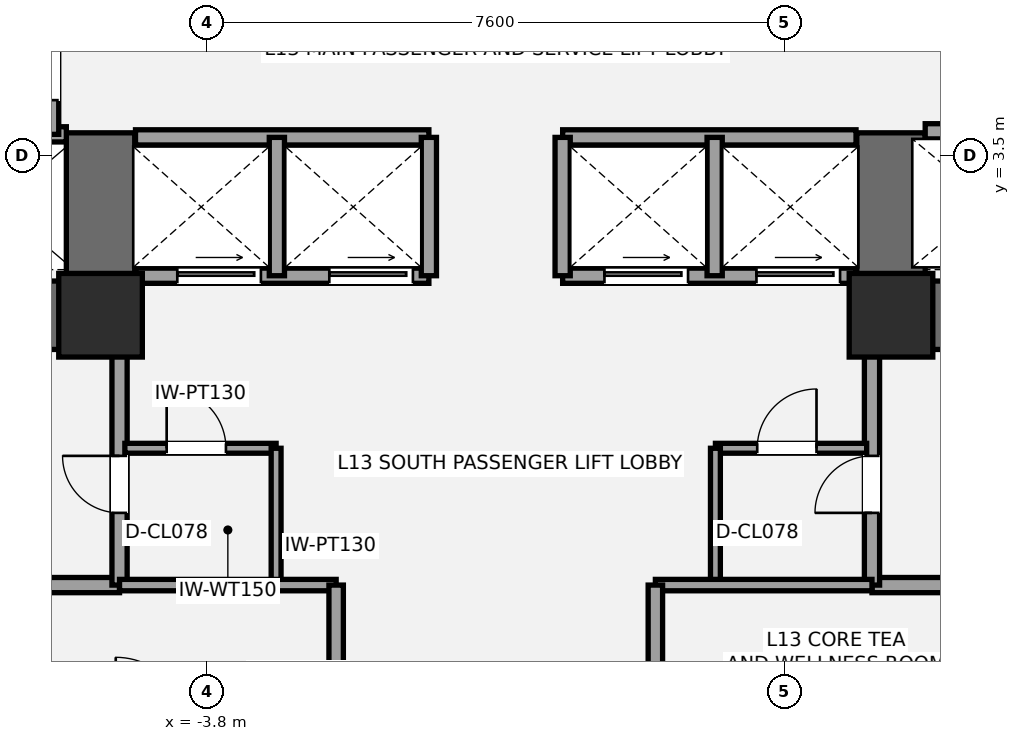
"""IFC4 building model, lengths in metres.
Left out: names, types, materials, properties, quantities, classifications, styles, units other than length and angle.
Written with IfcOpenShell. Run it as: python <this file> out.ifc"""

import sys

from ifc_helpers import new_model, si_unit, direction, frame, frame_2d, origin, origin_2d, place, context, subcontext, project, spatial, rectangle, extrude, element, fill, save


model = new_model("IFC4")
c1 = context("Model", 3, precision=1e-05, world=origin(), true_north=direction((0.0, 1.0)))
c2 = subcontext(c1, "Body", "Model", "MODEL_VIEW")
j1 = project(units=[si_unit("LENGTHUNIT", "METRE"), si_unit("PLANEANGLEUNIT", "RADIAN")], contexts=[c1])
p1 = place(None, origin())
s1 = spatial("IfcSite", under=j1, at=p1, CompositionType="ELEMENT")
p2 = place(p1, origin())
s2 = spatial("IfcBuilding", under=s1, at=p2, CompositionType="ELEMENT")
p3 = place(p2, frame((0.0, 0.0, 52.2)))
s3 = spatial("IfcBuildingStorey", under=s2, at=p3, CompositionType="ELEMENT", Elevation=52.2)
p4 = place(p3, frame((-4.75, 1.4, 0.0), z_axis=(0.0, 0.0, 1.0), x_axis=(-1.0, 0.0, 0.0)))
e1 = element("IfcWall", 1, at=p4, inside=s3, PredefinedType="SHEAR", context=c2, shape_type="SweptSolid", body=[
    extrude(rectangle(XDim=9.3, YDim=0.9, at=frame_2d((4.65, 0.0))), origin(), (0.0, 0.0, 1.0), 3.6),
])
p5 = place(p4, frame((5.55, 0.0, 0.0)))
e2 = element("IfcOpeningElement", 2, at=p5, cuts=e1, PredefinedType="OPENING", context=c2, shape_type="SweptSolid", body=[
    extrude(rectangle(XDim=1.05, YDim=2.15, at=frame_2d((0.525, 1.075))), frame((0.0, 0.46, 0.0), z_axis=(0.0, -1.0, 0.0), x_axis=(1.0, 0.0, 0.0)), (0.0, 0.0, 1.0), 0.92),
])
p6 = place(p4, frame((3.88, 0.0, 0.0)))
e3 = element("IfcOpeningElement", 3, at=p6, cuts=e1, PredefinedType="OPENING", context=c2, shape_type="SweptSolid", body=[
    extrude(rectangle(XDim=1.1, YDim=2.2, at=frame_2d((0.55, 1.1))), frame((0.0, 0.46, 0.0), z_axis=(0.0, -1.0, 0.0), x_axis=(1.0, 0.0, 0.0)), (0.0, 0.0, 1.0), 0.92),
])
p7 = place(p3, frame((-5.2, 0.95, 0.0), z_axis=(0.0, 0.0, 1.0), x_axis=(0.0, 1.0, 0.0)))
e4 = element("IfcWall", 4, at=p7, inside=s3, PredefinedType="SHEAR", context=c2, shape_type="SweptSolid", body=[
    extrude(rectangle(XDim=2.85, YDim=0.9, at=frame_2d((1.425, 0.0))), origin(), (0.0, 0.0, 1.0), 3.6),
])
p8 = place(p3, frame((14.05, 1.4, 0.0), z_axis=(0.0, 0.0, 1.0), x_axis=(-1.0, 0.0, 0.0)))
e5 = element("IfcWall", 5, at=p8, inside=s3, PredefinedType="SHEAR", context=c2, shape_type="SweptSolid", body=[
    extrude(rectangle(XDim=9.3, YDim=0.9, at=frame_2d((4.65, 0.0))), origin(), (0.0, 0.0, 1.0), 3.6),
])
p9 = place(p8, frame((2.7, 0.0, 0.0)))
e6 = element("IfcOpeningElement", 6, at=p9, cuts=e5, PredefinedType="OPENING", context=c2, shape_type="SweptSolid", body=[
    extrude(rectangle(XDim=1.05, YDim=2.15, at=frame_2d((0.525, 1.075))), frame((0.0, 0.46, 0.0), z_axis=(0.0, -1.0, 0.0), x_axis=(1.0, 0.0, 0.0)), (0.0, 0.0, 1.0), 0.92),
])
p10 = place(p8, frame((4.7, 0.0, 0.0)))
e7 = element("IfcOpeningElement", 7, at=p10, cuts=e5, PredefinedType="OPENING", context=c2, shape_type="SweptSolid", body=[
    extrude(rectangle(XDim=1.1, YDim=2.2, at=frame_2d((0.55, 1.1))), frame((0.0, 0.46, 0.0), z_axis=(0.0, -1.0, 0.0), x_axis=(1.0, 0.0, 0.0)), (0.0, 0.0, 1.0), 0.92),
])
p11 = place(p3, frame((5.2, 0.95, 0.0), z_axis=(0.0, 0.0, 1.0), x_axis=(0.0, 1.0, 0.0)))
e8 = element("IfcWall", 8, at=p11, inside=s3, PredefinedType="SHEAR", context=c2, shape_type="SweptSolid", body=[
    extrude(rectangle(XDim=2.85, YDim=0.9, at=frame_2d((1.425, 0.0))), origin(), (0.0, 0.0, 1.0), 3.6),
])
for number, where, z_axis, x_axis in (
    (9, (-5.2, 1.4, 0.0), (0.0, 0.0, 1.0), (1.0, 0.0, 0.0)),
    (10, (5.2, 1.4, 0.0), (0.0, 0.0, 1.0), (1.0, 0.0, 0.0)),
):
    element("IfcColumn", number, at=place(p3, frame(where, z_axis=z_axis, x_axis=x_axis)), inside=s3, PredefinedType="COLUMN", context=c2, shape_type="SweptSolid", body=[
        extrude(rectangle(XDim=1.1, YDim=1.1, at=origin_2d()), origin(), (0.0, 0.0, 1.0), 3.6),
    ])
p12 = place(p3, frame((-7.2, -2.15, 0.0), z_axis=(0.0, 0.0, 1.0), x_axis=(1.0, 0.0, 0.0)))
e11 = element("IfcWall", 11, at=p12, inside=s3, PredefinedType="SOLIDWALL", context=c2, shape_type="SweptSolid", body=[
    extrude(rectangle(XDim=2.25, YDim=0.2, at=frame_2d((1.125, 0.0))), origin(), (0.0, 0.0, 1.0), 3.4),
])
p13 = place(p3, frame((-4.95, -2.15, 0.0), z_axis=(0.0, 0.0, 1.0), x_axis=(0.0, 1.0, 0.0)))
e12 = element("IfcWall", 12, at=p13, inside=s3, PredefinedType="SOLIDWALL", context=c2, shape_type="SweptSolid", body=[
    extrude(rectangle(XDim=3.15, YDim=0.2, at=frame_2d((1.575, 0.0))), origin(), (0.0, 0.0, 1.0), 2.853),
])
p14 = place(p13, frame((0.95, 0.0, 0.0)))
e13 = element("IfcOpeningElement", 13, at=p14, cuts=e12, PredefinedType="OPENING", context=c2, shape_type="SweptSolid", body=[
    extrude(rectangle(XDim=0.75, YDim=2.1, at=frame_2d((0.375, 1.05))), frame((0.0, 0.11, 0.0), z_axis=(0.0, -1.0, 0.0), x_axis=(1.0, 0.0, 0.0)), (0.0, 0.0, 1.0), 0.22),
])
p15 = place(p3, frame((4.95, -2.15, 0.0), z_axis=(0.0, 0.0, 1.0), x_axis=(1.0, 0.0, 0.0)))
e14 = element("IfcWall", 14, at=p15, inside=s3, PredefinedType="SOLIDWALL", context=c2, shape_type="SweptSolid", body=[
    extrude(rectangle(XDim=2.25, YDim=0.2, at=frame_2d((1.125, 0.0))), origin(), (0.0, 0.0, 1.0), 3.4),
])
p16 = place(p3, frame((4.95, -2.15, 0.0), z_axis=(0.0, 0.0, 1.0), x_axis=(0.0, 1.0, 0.0)))
e15 = element("IfcWall", 15, at=p16, inside=s3, PredefinedType="SOLIDWALL", context=c2, shape_type="SweptSolid", body=[
    extrude(rectangle(XDim=3.15, YDim=0.2, at=frame_2d((1.575, 0.0))), origin(), (0.0, 0.0, 1.0), 2.853),
])
p17 = place(p16, frame((0.95, 0.0, 0.0)))
e16 = element("IfcOpeningElement", 16, at=p17, cuts=e15, PredefinedType="OPENING", context=c2, shape_type="SweptSolid", body=[
    extrude(rectangle(XDim=0.75, YDim=2.1, at=frame_2d((0.375, 1.05))), frame((0.0, 0.11, 0.0), z_axis=(0.0, -1.0, 0.0), x_axis=(1.0, 0.0, 0.0)), (0.0, 0.0, 1.0), 0.22),
])
p18 = place(p3, frame((-4.88, -0.35, 0.0), z_axis=(0.0, 0.0, 1.0), x_axis=(1.0, 0.0, 0.0)))
e17 = element("IfcWall", 17, at=p18, inside=s3, PredefinedType="PARTITIONING", context=c2, shape_type="SweptSolid", body=[
    extrude(rectangle(XDim=1.99, YDim=0.13, at=frame_2d((0.995, 0.0))), origin(), (0.0, 0.0, 1.0), 3.4),
])
p19 = place(p18, frame((0.55, 0.0, 0.0)))
e18 = element("IfcOpeningElement", 18, at=p19, cuts=e17, PredefinedType="OPENING", context=c2, shape_type="SweptSolid", body=[
    extrude(rectangle(XDim=0.78, YDim=2.1, at=frame_2d((0.39, 1.05))), frame((0.0, 0.075, 0.0), z_axis=(0.0, -1.0, 0.0), x_axis=(1.0, 0.0, 0.0)), (0.0, 0.0, 1.0), 0.15),
])
p20 = place(p3, frame((-2.89, -2.15, 0.0), z_axis=(0.0, 0.0, 1.0), x_axis=(0.0, 1.0, 0.0)))
e19 = element("IfcWall", 19, at=p20, inside=s3, PredefinedType="PARTITIONING", context=c2, shape_type="SweptSolid", body=[
    extrude(rectangle(XDim=1.8, YDim=0.13, at=frame_2d((0.9, 0.0))), origin(), (0.0, 0.0, 1.0), 2.853),
])
p21 = place(p3, frame((2.89, -0.35, 0.0), z_axis=(0.0, 0.0, 1.0), x_axis=(1.0, 0.0, 0.0)))
e20 = element("IfcWall", 20, at=p21, inside=s3, PredefinedType="PARTITIONING", context=c2, shape_type="SweptSolid", body=[
    extrude(rectangle(XDim=1.99, YDim=0.13, at=frame_2d((0.995, 0.0))), origin(), (0.0, 0.0, 1.0), 3.4),
])
p22 = place(p21, frame((0.55, 0.0, 0.0)))
e21 = element("IfcOpeningElement", 21, at=p22, cuts=e20, PredefinedType="OPENING", context=c2, shape_type="SweptSolid", body=[
    extrude(rectangle(XDim=0.78, YDim=2.1, at=frame_2d((0.39, 1.05))), frame((0.0, 0.075, 0.0), z_axis=(0.0, -1.0, 0.0), x_axis=(1.0, 0.0, 0.0)), (0.0, 0.0, 1.0), 0.15),
])
p23 = place(p3, frame((2.89, -2.15, 0.0), z_axis=(0.0, 0.0, 1.0), x_axis=(0.0, 1.0, 0.0)))
e22 = element("IfcWall", 22, at=p23, inside=s3, PredefinedType="PARTITIONING", context=c2, shape_type="SweptSolid", body=[
    extrude(rectangle(XDim=1.8, YDim=0.13, at=frame_2d((0.9, 0.0))), origin(), (0.0, 0.0, 1.0), 3.4),
])
p24 = place(p3, frame((-9.78, 3.78, 0.0), z_axis=(0.0, 0.0, 1.0), x_axis=(1.0, 0.0, 0.0)))
e23 = element("IfcWall", 23, at=p24, inside=s3, PredefinedType="SOLIDWALL", context=c2, shape_type="SweptSolid", body=[
    extrude(rectangle(XDim=4.13, YDim=0.2, at=frame_2d((2.065, 0.0))), origin(), (0.0, 0.0, 1.0), 3.4),
])
p25 = place(p3, frame((-5.85, 3.78, 0.0), z_axis=(0.0, 0.0, 1.0), x_axis=(0.0, 1.0, 0.0)))
e24 = element("IfcWall", 24, at=p25, inside=s3, PredefinedType="SOLIDWALL", context=c2, shape_type="SweptSolid", body=[
    extrude(rectangle(XDim=1.69, YDim=0.2, at=frame_2d((0.845, 0.0))), origin(), (0.0, 0.0, 1.0), 3.4),
])
p26 = place(p25, frame((0.45, 0.0, 0.0)))
e25 = element("IfcOpeningElement", 25, at=p26, cuts=e24, PredefinedType="OPENING", context=c2, shape_type="SweptSolid", body=[
    extrude(rectangle(XDim=0.75, YDim=2.1, at=frame_2d((0.375, 1.05))), frame((0.0, 0.11, 0.0), z_axis=(0.0, -1.0, 0.0), x_axis=(1.0, 0.0, 0.0)), (0.0, 0.0, 1.0), 0.22),
])
p27 = place(p3, frame((5.65, 3.82, 0.0), z_axis=(0.0, 0.0, 1.0), x_axis=(1.0, 0.0, 0.0)))
e26 = element("IfcWall", 26, at=p27, inside=s3, PredefinedType="SOLIDWALL", context=c2, shape_type="SweptSolid", body=[
    extrude(rectangle(XDim=4.13, YDim=0.2, at=frame_2d((2.065, 0.0))), origin(), (0.0, 0.0, 1.0), 3.4),
])
p28 = place(p27, frame((0.65, 0.0, 0.0)))
e27 = element("IfcOpeningElement", 27, at=p28, cuts=e26, PredefinedType="OPENING", context=c2, shape_type="SweptSolid", body=[
    extrude(rectangle(XDim=1.2, YDim=2.2, at=frame_2d((0.6, 1.1))), frame((0.0, 0.11, 0.0), z_axis=(0.0, -1.0, 0.0), x_axis=(1.0, 0.0, 0.0)), (0.0, 0.0, 1.0), 0.22),
])
p29 = place(p3, frame((-4.74, 1.92, 0.0), z_axis=(0.0, 0.0, 1.0), x_axis=(1.0, 0.0, 0.0)))
e28 = element("IfcWall", 28, at=p29, inside=s3, PredefinedType="SOLIDWALL", context=c2, shape_type="SweptSolid", body=[
    extrude(rectangle(XDim=3.86, YDim=0.2, at=frame_2d((1.93, 0.0))), origin(), (0.0, 0.0, 1.0), 2.39),
])
p30 = place(p29, frame((0.55, 0.0, 0.0)))
e29 = element("IfcOpeningElement", 29, at=p30, cuts=e28, PredefinedType="OPENING", context=c2, shape_type="SweptSolid", body=[
    extrude(rectangle(XDim=1.1, YDim=2.2, at=frame_2d((0.55, 1.1))), frame((0.0, 0.11, 0.0), z_axis=(0.0, -1.0, 0.0), x_axis=(1.0, 0.0, 0.0)), (0.0, 0.0, 1.0), 0.22),
])
p31 = place(p29, frame((2.55, 0.0, 0.0)))
e30 = element("IfcOpeningElement", 30, at=p31, cuts=e28, PredefinedType="OPENING", context=c2, shape_type="SweptSolid", body=[
    extrude(rectangle(XDim=1.1, YDim=2.2, at=frame_2d((0.55, 1.1))), frame((0.0, 0.11, 0.0), z_axis=(0.0, -1.0, 0.0), x_axis=(1.0, 0.0, 0.0)), (0.0, 0.0, 1.0), 0.22),
])
p32 = place(p3, frame((0.88, 1.92, 0.0), z_axis=(0.0, 0.0, 1.0), x_axis=(1.0, 0.0, 0.0)))
e31 = element("IfcWall", 31, at=p32, inside=s3, PredefinedType="SOLIDWALL", context=c2, shape_type="SweptSolid", body=[
    extrude(rectangle(XDim=3.86, YDim=0.2, at=frame_2d((1.93, 0.0))), origin(), (0.0, 0.0, 1.0), 2.39),
])
p33 = place(p32, frame((0.55, 0.0, 0.0)))
e32 = element("IfcOpeningElement", 32, at=p33, cuts=e31, PredefinedType="OPENING", context=c2, shape_type="SweptSolid", body=[
    extrude(rectangle(XDim=1.1, YDim=2.2, at=frame_2d((0.55, 1.1))), frame((0.0, 0.11, 0.0), z_axis=(0.0, -1.0, 0.0), x_axis=(1.0, 0.0, 0.0)), (0.0, 0.0, 1.0), 0.22),
])
p34 = place(p32, frame((2.55, 0.0, 0.0)))
e33 = element("IfcOpeningElement", 33, at=p34, cuts=e31, PredefinedType="OPENING", context=c2, shape_type="SweptSolid", body=[
    extrude(rectangle(XDim=1.1, YDim=2.2, at=frame_2d((0.55, 1.1))), frame((0.0, 0.11, 0.0), z_axis=(0.0, -1.0, 0.0), x_axis=(1.0, 0.0, 0.0)), (0.0, 0.0, 1.0), 0.22),
])
for number, where, z_axis, x_axis in (
    (34, (-4.74, 3.74, 0.0), (0.0, 0.0, 1.0), (1.0, 0.0, 0.0)),
    (35, (0.88, 3.74, 0.0), (0.0, 0.0, 1.0), (1.0, 0.0, 0.0)),
):
    element("IfcWall", number, at=place(p3, frame(where, z_axis=z_axis, x_axis=x_axis)), inside=s3, PredefinedType="SOLIDWALL", context=c2, shape_type="SweptSolid", body=[
        extrude(rectangle(XDim=3.86, YDim=0.2, at=frame_2d((1.93, 0.0))), origin(), (0.0, 0.0, 1.0), 3.4),
    ])
for number, where, z_axis, x_axis in (
    (36, (-2.88, 1.92, 0.0), (0.0, 0.0, 1.0), (0.0, 1.0, 0.0)),
    (37, (2.88, 1.92, 0.0), (0.0, 0.0, 1.0), (0.0, 1.0, 0.0)),
    (38, (-0.88, 1.92, 0.0), (0.0, 0.0, 1.0), (0.0, 1.0, 0.0)),
    (39, (0.88, 1.92, 0.0), (0.0, 0.0, 1.0), (0.0, 1.0, 0.0)),
):
    element("IfcWall", number, at=place(p3, frame(where, z_axis=z_axis, x_axis=x_axis)), inside=s3, PredefinedType="SOLIDWALL", context=c2, shape_type="SweptSolid", body=[
        extrude(rectangle(XDim=1.82, YDim=0.2, at=frame_2d((0.91, 0.0))), origin(), (0.0, 0.0, 1.0), 3.4),
    ])
p35 = place(p3, frame((-4.95, -2.15, 0.0), z_axis=(0.0, 0.0, 1.0), x_axis=(1.0, 0.0, 0.0)))
e40 = element("IfcWall", 40, at=p35, inside=s3, PredefinedType="PLUMBINGWALL", context=c2, shape_type="SweptSolid", body=[
    extrude(rectangle(XDim=2.85, YDim=0.15, at=frame_2d((1.425, 0.0))), origin(), (0.0, 0.0, 1.0), 3.4),
])
p36 = place(p3, frame((-2.1, -4.05, 0.0), z_axis=(0.0, 0.0, 1.0), x_axis=(0.0, 1.0, 0.0)))
e41 = element("IfcWall", 41, at=p36, inside=s3, PredefinedType="PLUMBINGWALL", context=c2, shape_type="SweptSolid", body=[
    extrude(rectangle(XDim=1.9, YDim=0.19, at=frame_2d((0.95, 0.0))), origin(), (0.0, 0.0, 1.0), 2.853),
])
p37 = place(p3, frame((2.1, -2.15, 0.0), z_axis=(0.0, 0.0, 1.0), x_axis=(1.0, 0.0, 0.0)))
e42 = element("IfcWall", 42, at=p37, inside=s3, PredefinedType="PLUMBINGWALL", context=c2, shape_type="SweptSolid", body=[
    extrude(rectangle(XDim=2.85, YDim=0.15, at=frame_2d((1.425, 0.0))), origin(), (0.0, 0.0, 1.0), 3.4),
])
p38 = place(p3, frame((2.1, -4.05, 0.0), z_axis=(0.0, 0.0, 1.0), x_axis=(0.0, 1.0, 0.0)))
e43 = element("IfcWall", 43, at=p38, inside=s3, PredefinedType="PLUMBINGWALL", context=c2, shape_type="SweptSolid", body=[
    extrude(rectangle(XDim=1.9, YDim=0.19, at=frame_2d((0.95, 0.0))), origin(), (0.0, 0.0, 1.0), 3.4),
])
p39 = place(p14, origin())
e44 = element("IfcDoor", 44, at=p39, inside=s3, OperationType="SINGLE_SWING_RIGHT", PredefinedType="DOOR", context=c2, shape_type="SweptSolid", body=[
    extrude(rectangle(XDim=0.75, YDim=2.1, at=frame_2d((0.375, 1.05))), frame((0.0, 0.025, 0.0), z_axis=(0.0, -1.0, 0.0), x_axis=(1.0, 0.0, 0.0)), (0.0, 0.0, 1.0), 0.05),
])
fill(e13, e44)
p40 = place(p17, origin())
e45 = element("IfcDoor", 45, at=p40, inside=s3, OperationType="SINGLE_SWING_LEFT", PredefinedType="DOOR", context=c2, shape_type="SweptSolid", body=[
    extrude(rectangle(XDim=0.75, YDim=2.1, at=frame_2d((0.375, 1.05))), frame((0.0, 0.025, 0.0), z_axis=(0.0, -1.0, 0.0), x_axis=(1.0, 0.0, 0.0)), (0.0, 0.0, 1.0), 0.05),
])
fill(e16, e45)
p41 = place(p19, origin())
e46 = element("IfcDoor", 46, at=p41, inside=s3, OperationType="SINGLE_SWING_LEFT", PredefinedType="DOOR", context=c2, shape_type="SweptSolid", body=[
    extrude(rectangle(XDim=0.78, YDim=2.1, at=frame_2d((0.39, 1.05))), frame((0.0, 0.025, 0.0), z_axis=(0.0, -1.0, 0.0), x_axis=(1.0, 0.0, 0.0)), (0.0, 0.0, 1.0), 0.05),
])
fill(e18, e46)
p42 = place(p22, origin())
e47 = element("IfcDoor", 47, at=p42, inside=s3, OperationType="SINGLE_SWING_RIGHT", PredefinedType="DOOR", context=c2, shape_type="SweptSolid", body=[
    extrude(rectangle(XDim=0.78, YDim=2.1, at=frame_2d((0.39, 1.05))), frame((0.0, 0.025, 0.0), z_axis=(0.0, -1.0, 0.0), x_axis=(1.0, 0.0, 0.0)), (0.0, 0.0, 1.0), 0.05),
])
fill(e21, e47)
p43 = place(p26, origin())
e48 = element("IfcDoor", 48, at=p43, inside=s3, OperationType="SINGLE_SWING_RIGHT", PredefinedType="DOOR", context=c2, shape_type="SweptSolid", body=[
    extrude(rectangle(XDim=0.75, YDim=2.1, at=frame_2d((0.375, 1.05))), frame((0.0, 0.025, 0.0), z_axis=(0.0, -1.0, 0.0), x_axis=(1.0, 0.0, 0.0)), (0.0, 0.0, 1.0), 0.05),
])
fill(e25, e48)
p44 = place(p30, origin())
e49 = element("IfcDoor", 49, at=p44, inside=s3, OperationType="SLIDING_TO_LEFT", PredefinedType="DOOR", context=c2, shape_type="SweptSolid", body=[
    extrude(rectangle(XDim=1.1, YDim=2.2, at=frame_2d((0.55, 1.1))), frame((0.0, 0.025, 0.0), z_axis=(0.0, -1.0, 0.0), x_axis=(1.0, 0.0, 0.0)), (0.0, 0.0, 1.0), 0.05),
])
fill(e29, e49)
p45 = place(p31, origin())
e50 = element("IfcDoor", 50, at=p45, inside=s3, OperationType="SLIDING_TO_LEFT", PredefinedType="DOOR", context=c2, shape_type="SweptSolid", body=[
    extrude(rectangle(XDim=1.1, YDim=2.2, at=frame_2d((0.55, 1.1))), frame((0.0, 0.025, 0.0), z_axis=(0.0, -1.0, 0.0), x_axis=(1.0, 0.0, 0.0)), (0.0, 0.0, 1.0), 0.05),
])
fill(e30, e50)
p46 = place(p33, origin())
e51 = element("IfcDoor", 51, at=p46, inside=s3, OperationType="SLIDING_TO_LEFT", PredefinedType="DOOR", context=c2, shape_type="SweptSolid", body=[
    extrude(rectangle(XDim=1.1, YDim=2.2, at=frame_2d((0.55, 1.1))), frame((0.0, 0.025, 0.0), z_axis=(0.0, -1.0, 0.0), x_axis=(1.0, 0.0, 0.0)), (0.0, 0.0, 1.0), 0.05),
])
fill(e32, e51)
p47 = place(p34, origin())
e52 = element("IfcDoor", 52, at=p47, inside=s3, OperationType="SLIDING_TO_LEFT", PredefinedType="DOOR", context=c2, shape_type="SweptSolid", body=[
    extrude(rectangle(XDim=1.1, YDim=2.2, at=frame_2d((0.55, 1.1))), frame((0.0, 0.025, 0.0), z_axis=(0.0, -1.0, 0.0), x_axis=(1.0, 0.0, 0.0)), (0.0, 0.0, 1.0), 0.05),
])
fill(e33, e52)
save(model, sys.argv[1])
